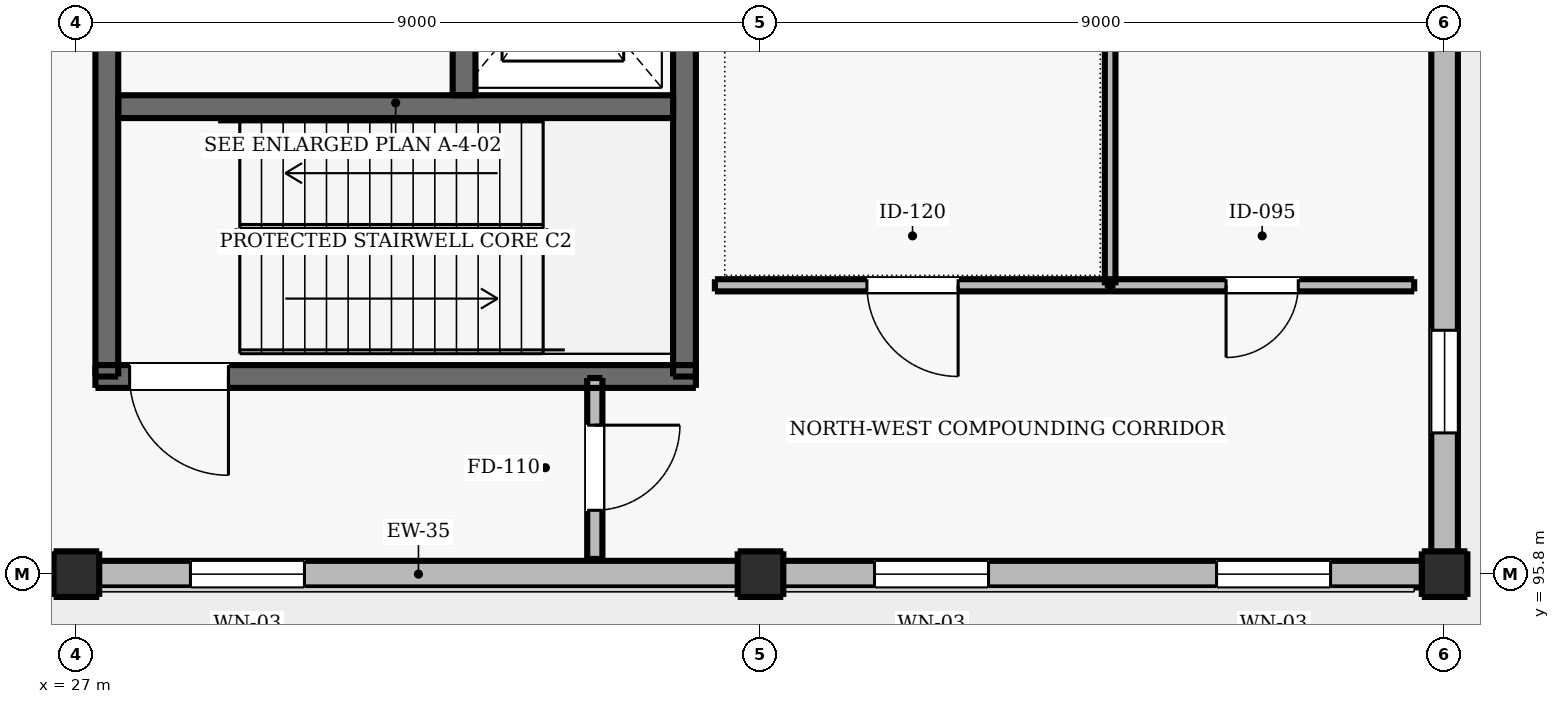
"""IFC4 building model, lengths in metres.
Left out: names, types, materials, properties, quantities, classifications, styles, units other than length and angle.
Written with IfcOpenShell. Run it as: python <this file> out.ifc"""

import sys

from ifc_helpers import new_model, si_unit, direction, frame, frame_2d, origin, origin_2d, place, context, subcontext, project, spatial, rectangle, extrude, element, fill, save


model = new_model("IFC4")
c1 = context("Model", 3, precision=1e-05, world=origin(), true_north=direction((0.0, 1.0)))
c2 = subcontext(c1, "Body", "Model", "MODEL_VIEW")
j1 = project(units=[si_unit("LENGTHUNIT", "METRE"), si_unit("PLANEANGLEUNIT", "RADIAN")], contexts=[c1])
p1 = place(None, origin())
s1 = spatial("IfcSite", under=j1, at=p1, CompositionType="ELEMENT")
p2 = place(p1, origin())
s2 = spatial("IfcBuilding", under=s1, at=p2, CompositionType="ELEMENT")
p3 = place(p2, origin())
s3 = spatial("IfcBuildingStorey", under=s2, at=p3, CompositionType="ELEMENT", Elevation=0.0)
for number, where, z_axis, x_axis in (
    (1, (27.0, 95.8, 0.0), (0.0, 0.0, 1.0), (1.0, 0.0, 0.0)),
    (2, (36.0, 95.8, 0.0), (0.0, 0.0, 1.0), (1.0, 0.0, 0.0)),
    (3, (45.0, 95.8, 0.0), (0.0, 0.0, 1.0), (1.0, 0.0, 0.0)),
):
    element("IfcColumn", number, at=place(p3, frame(where, z_axis=z_axis, x_axis=x_axis)), inside=s3, PredefinedType="COLUMN", context=c2, shape_type="SweptSolid", body=[
        extrude(rectangle(XDim=0.6, YDim=0.6, at=origin_2d()), origin(), (0.0, 0.0, 1.0), 5.1),
    ])
p4 = place(p3, frame((27.25, 98.4, 0.0), z_axis=(0.0, 0.0, 1.0), x_axis=(1.0, 0.0, 0.0)))
e4 = element("IfcWall", 4, at=p4, inside=s3, PredefinedType="SHEAR", context=c2, shape_type="SweptSolid", body=[
    extrude(rectangle(XDim=7.9, YDim=0.3, at=frame_2d((3.95, 0.0))), origin(), (0.0, 0.0, 1.0), 5.1),
])
p5 = place(p4, frame((0.45, 0.0, 0.0)))
e5 = element("IfcOpeningElement", 5, at=p5, cuts=e4, PredefinedType="OPENING", context=c2, shape_type="SweptSolid", body=[
    extrude(rectangle(XDim=1.3, YDim=2.15, at=frame_2d((0.65, 1.075))), frame((0.0, 0.16, 0.0), z_axis=(0.0, -1.0, 0.0), x_axis=(1.0, 0.0, 0.0)), (0.0, 0.0, 1.0), 0.32),
])
for number, where, z_axis, x_axis in (
    (6, (27.4, 98.4, 0.0), (0.0, 0.0, 1.0), (0.0, 1.0, 0.0)),
    (7, (35.0, 98.4, 0.0), (0.0, 0.0, 1.0), (0.0, 1.0, 0.0)),
):
    element("IfcWall", number, at=place(p3, frame(where, z_axis=z_axis, x_axis=x_axis)), inside=s3, PredefinedType="SHEAR", context=c2, shape_type="SweptSolid", body=[
        extrude(rectangle(XDim=7.2, YDim=0.3, at=frame_2d((3.6, 0.0))), origin(), (0.0, 0.0, 1.0), 5.1),
    ])
p6 = place(p3, frame((27.55, 101.95, 0.0), z_axis=(0.0, 0.0, 1.0), x_axis=(1.0, 0.0, 0.0)))
e8 = element("IfcWall", 8, at=p6, inside=s3, PredefinedType="SHEAR", context=c2, shape_type="SweptSolid", body=[
    extrude(rectangle(XDim=7.3, YDim=0.3, at=frame_2d((3.65, 0.0))), origin(), (0.0, 0.0, 1.0), 5.1),
])
p7 = place(p3, frame((32.1, 102.1, 0.0), z_axis=(0.0, 0.0, 1.0), x_axis=(0.0, 1.0, 0.0)))
e9 = element("IfcWall", 9, at=p7, inside=s3, PredefinedType="SHEAR", context=c2, shape_type="SweptSolid", body=[
    extrude(rectangle(XDim=3.35, YDim=0.3, at=frame_2d((1.675, 0.0))), origin(), (0.0, 0.0, 1.0), 5.1),
])
p8 = place(p7, frame((1.125, 0.0, 0.0)))
e10 = element("IfcOpeningElement", 10, at=p8, cuts=e9, PredefinedType="OPENING", context=c2, shape_type="SweptSolid", body=[
    extrude(rectangle(XDim=1.1, YDim=2.15, at=frame_2d((0.55, 1.075))), frame((0.0, 0.16, 0.0), z_axis=(0.0, -1.0, 0.0), x_axis=(1.0, 0.0, 0.0)), (0.0, 0.0, 1.0), 0.32),
])
p9 = place(p3, frame((45.0, 111.0, 0.0), z_axis=(0.0, 0.0, 1.0), x_axis=(0.0, -1.0, 0.0)))
e11 = element("IfcWall", 11, at=p9, inside=s3, PredefinedType="SOLIDWALL", context=c2, shape_type="SweptSolid", body=[
    extrude(rectangle(XDim=15.2, YDim=0.35, at=frame_2d((7.6, 0.0))), origin(), (0.0, 0.0, 1.0), 4.16),
])
p10 = place(p9, frame((1.858, 0.0, 1.05)))
e12 = element("IfcOpeningElement", 12, at=p10, cuts=e11, PredefinedType="OPENING", context=c2, shape_type="SweptSolid", body=[
    extrude(rectangle(XDim=1.35, YDim=1.5, at=frame_2d((0.675, 0.75))), frame((0.0, 0.185, 0.0), z_axis=(0.0, -1.0, 0.0), x_axis=(1.0, 0.0, 0.0)), (0.0, 0.0, 1.0), 0.37),
])
p11 = place(p9, frame((11.992, 0.0, 1.05)))
e13 = element("IfcOpeningElement", 13, at=p11, cuts=e11, PredefinedType="OPENING", context=c2, shape_type="SweptSolid", body=[
    extrude(rectangle(XDim=1.35, YDim=1.5, at=frame_2d((0.675, 0.75))), frame((0.0, 0.185, 0.0), z_axis=(0.0, -1.0, 0.0), x_axis=(1.0, 0.0, 0.0)), (0.0, 0.0, 1.0), 0.37),
])
p12 = place(p3, frame((45.0, 95.8, 0.0), z_axis=(0.0, 0.0, 1.0), x_axis=(-1.0, 0.0, 0.0)))
e14 = element("IfcWall", 14, at=p12, inside=s3, PredefinedType="SOLIDWALL", context=c2, shape_type="SweptSolid", body=[
    extrude(rectangle(XDim=27.0, YDim=0.35, at=frame_2d((13.5, 0.0))), origin(), (0.0, 0.0, 1.0), 4.01),
])
p13 = place(p12, frame((1.5, 0.0, 1.05)))
e15 = element("IfcOpeningElement", 15, at=p13, cuts=e14, PredefinedType="OPENING", context=c2, shape_type="SweptSolid", body=[
    extrude(rectangle(XDim=1.5, YDim=1.6, at=frame_2d((0.75, 0.8))), frame((0.0, 0.185, 0.0), z_axis=(0.0, -1.0, 0.0), x_axis=(1.0, 0.0, 0.0)), (0.0, 0.0, 1.0), 0.37),
])
p14 = place(p12, frame((6.0, 0.0, 1.05)))
e16 = element("IfcOpeningElement", 16, at=p14, cuts=e14, PredefinedType="OPENING", context=c2, shape_type="SweptSolid", body=[
    extrude(rectangle(XDim=1.5, YDim=1.6, at=frame_2d((0.75, 0.8))), frame((0.0, 0.185, 0.0), z_axis=(0.0, -1.0, 0.0), x_axis=(1.0, 0.0, 0.0)), (0.0, 0.0, 1.0), 0.37),
])
p15 = place(p12, frame((15.0, 0.0, 1.05)))
e17 = element("IfcOpeningElement", 17, at=p15, cuts=e14, PredefinedType="OPENING", context=c2, shape_type="SweptSolid", body=[
    extrude(rectangle(XDim=1.5, YDim=1.6, at=frame_2d((0.75, 0.8))), frame((0.0, 0.185, 0.0), z_axis=(0.0, -1.0, 0.0), x_axis=(1.0, 0.0, 0.0)), (0.0, 0.0, 1.0), 0.37),
])
p16 = place(p12, frame((19.5, 0.0, 1.05)))
e18 = element("IfcOpeningElement", 18, at=p16, cuts=e14, PredefinedType="OPENING", context=c2, shape_type="SweptSolid", body=[
    extrude(rectangle(XDim=1.5, YDim=1.6, at=frame_2d((0.75, 0.8))), frame((0.0, 0.185, 0.0), z_axis=(0.0, -1.0, 0.0), x_axis=(1.0, 0.0, 0.0)), (0.0, 0.0, 1.0), 0.37),
])
p17 = place(p12, frame((24.0, 0.0, 1.05)))
e19 = element("IfcOpeningElement", 19, at=p17, cuts=e14, PredefinedType="OPENING", context=c2, shape_type="SweptSolid", body=[
    extrude(rectangle(XDim=1.5, YDim=1.6, at=frame_2d((0.75, 0.8))), frame((0.0, 0.185, 0.0), z_axis=(0.0, -1.0, 0.0), x_axis=(1.0, 0.0, 0.0)), (0.0, 0.0, 1.0), 0.37),
])
p18 = place(p3, frame((33.82, 96.0, 0.0), z_axis=(0.0, 0.0, 1.0), x_axis=(0.0, 1.0, 0.0)))
e20 = element("IfcWall", 20, at=p18, inside=s3, PredefinedType="PARTITIONING", context=c2, shape_type="SweptSolid", body=[
    extrude(rectangle(XDim=2.38, YDim=0.2, at=frame_2d((1.19, 0.0))), origin(), (0.0, 0.0, 1.0), 4.82),
])
p19 = place(p18, frame((0.64, 0.0, 0.0)))
e21 = element("IfcOpeningElement", 21, at=p19, cuts=e20, PredefinedType="OPENING", context=c2, shape_type="SweptSolid", body=[
    extrude(rectangle(XDim=1.12, YDim=2.15, at=frame_2d((0.56, 1.075))), frame((0.0, 0.11, 0.0), z_axis=(0.0, -1.0, 0.0), x_axis=(1.0, 0.0, 0.0)), (0.0, 0.0, 1.0), 0.22),
])
p20 = place(p3, frame((35.4, 99.6, 0.0), z_axis=(0.0, 0.0, 1.0), x_axis=(1.0, 0.0, 0.0)))
e22 = element("IfcWall", 22, at=p20, inside=s3, PredefinedType="PARTITIONING", context=c2, shape_type="SweptSolid", body=[
    extrude(rectangle(XDim=5.2, YDim=0.16, at=frame_2d((2.6, 0.0))), origin(), (0.0, 0.0, 1.0), 4.82),
])
p21 = place(p20, frame((2.0, 0.0, 0.0)))
e23 = element("IfcOpeningElement", 23, at=p21, cuts=e22, PredefinedType="OPENING", context=c2, shape_type="SweptSolid", body=[
    extrude(rectangle(XDim=1.2, YDim=2.2, at=frame_2d((0.6, 1.1))), frame((0.0, 0.09, 0.0), z_axis=(0.0, -1.0, 0.0), x_axis=(1.0, 0.0, 0.0)), (0.0, 0.0, 1.0), 0.18),
])
p22 = place(p3, frame((40.6, 99.6, 0.0), z_axis=(0.0, 0.0, 1.0), x_axis=(0.0, 1.0, 0.0)))
e24 = element("IfcWall", 24, at=p22, inside=s3, PredefinedType="PARTITIONING", context=c2, shape_type="SweptSolid", body=[
    extrude(rectangle(XDim=11.0, YDim=0.14, at=frame_2d((5.5, 0.0))), origin(), (0.0, 0.0, 1.0), 4.82),
])
p23 = place(p3, frame((40.6, 99.6, 0.0), z_axis=(0.0, 0.0, 1.0), x_axis=(1.0, 0.0, 0.0)))
e25 = element("IfcWall", 25, at=p23, inside=s3, PredefinedType="PARTITIONING", context=c2, shape_type="SweptSolid", body=[
    extrude(rectangle(XDim=4.0, YDim=0.16, at=frame_2d((2.0, 0.0))), origin(), (0.0, 0.0, 1.0), 4.82),
])
p24 = place(p23, frame((1.525, 0.0, 0.0)))
e26 = element("IfcOpeningElement", 26, at=p24, cuts=e25, PredefinedType="OPENING", context=c2, shape_type="SweptSolid", body=[
    extrude(rectangle(XDim=0.95, YDim=2.1, at=frame_2d((0.475, 1.05))), frame((0.0, 0.09, 0.0), z_axis=(0.0, -1.0, 0.0), x_axis=(1.0, 0.0, 0.0)), (0.0, 0.0, 1.0), 0.18),
])
p25 = place(p11, origin())
e27 = element("IfcWindow", 27, at=p25, inside=s3, PartitioningType="SINGLE_PANEL", PredefinedType="WINDOW", context=c2, shape_type="SweptSolid", body=[
    extrude(rectangle(XDim=1.35, YDim=1.5, at=frame_2d((0.675, 0.75))), frame((0.0, 0.03, 0.0), z_axis=(0.0, -1.0, 0.0), x_axis=(1.0, 0.0, 0.0)), (0.0, 0.0, 1.0), 0.06),
])
fill(e13, e27)
p26 = place(p13, origin())
e28 = element("IfcWindow", 28, at=p26, inside=s3, PartitioningType="SINGLE_PANEL", PredefinedType="WINDOW", context=c2, shape_type="SweptSolid", body=[
    extrude(rectangle(XDim=1.5, YDim=1.6, at=frame_2d((0.75, 0.8))), frame((0.0, 0.03, 0.0), z_axis=(0.0, -1.0, 0.0), x_axis=(1.0, 0.0, 0.0)), (0.0, 0.0, 1.0), 0.06),
])
fill(e15, e28)
p27 = place(p14, origin())
e29 = element("IfcWindow", 29, at=p27, inside=s3, PartitioningType="SINGLE_PANEL", PredefinedType="WINDOW", context=c2, shape_type="SweptSolid", body=[
    extrude(rectangle(XDim=1.5, YDim=1.6, at=frame_2d((0.75, 0.8))), frame((0.0, 0.03, 0.0), z_axis=(0.0, -1.0, 0.0), x_axis=(1.0, 0.0, 0.0)), (0.0, 0.0, 1.0), 0.06),
])
fill(e16, e29)
p28 = place(p15, origin())
e30 = element("IfcWindow", 30, at=p28, inside=s3, PartitioningType="SINGLE_PANEL", PredefinedType="WINDOW", context=c2, shape_type="SweptSolid", body=[
    extrude(rectangle(XDim=1.5, YDim=1.6, at=frame_2d((0.75, 0.8))), frame((0.0, 0.03, 0.0), z_axis=(0.0, -1.0, 0.0), x_axis=(1.0, 0.0, 0.0)), (0.0, 0.0, 1.0), 0.06),
])
fill(e17, e30)
p29 = place(p5, frame((1.3, 0.0, 0.0), z_axis=(0.0, 0.0, 1.0), x_axis=(-1.0, 0.0, 0.0)))
e31 = element("IfcDoor", 31, at=p29, inside=s3, OperationType="SINGLE_SWING_RIGHT", PredefinedType="DOOR", context=c2, shape_type="SweptSolid", body=[
    extrude(rectangle(XDim=1.3, YDim=2.15, at=frame_2d((0.65, 1.075))), frame((0.0, 0.025, 0.0), z_axis=(0.0, -1.0, 0.0), x_axis=(1.0, 0.0, 0.0)), (0.0, 0.0, 1.0), 0.05),
])
fill(e5, e31)
p30 = place(p19, frame((1.12, 0.0, 0.0), z_axis=(0.0, 0.0, 1.0), x_axis=(-1.0, 0.0, 0.0)))
e32 = element("IfcDoor", 32, at=p30, inside=s3, OperationType="SINGLE_SWING_RIGHT", PredefinedType="DOOR", context=c2, shape_type="SweptSolid", body=[
    extrude(rectangle(XDim=1.12, YDim=2.15, at=frame_2d((0.56, 1.075))), frame((0.0, 0.025, 0.0), z_axis=(0.0, -1.0, 0.0), x_axis=(1.0, 0.0, 0.0)), (0.0, 0.0, 1.0), 0.05),
])
fill(e21, e32)
p31 = place(p21, frame((1.2, 0.0, 0.0), z_axis=(0.0, 0.0, 1.0), x_axis=(-1.0, 0.0, 0.0)))
e33 = element("IfcDoor", 33, at=p31, inside=s3, OperationType="SINGLE_SWING_RIGHT", PredefinedType="DOOR", context=c2, shape_type="SweptSolid", body=[
    extrude(rectangle(XDim=1.2, YDim=2.2, at=frame_2d((0.6, 1.1))), frame((0.0, 0.025, 0.0), z_axis=(0.0, -1.0, 0.0), x_axis=(1.0, 0.0, 0.0)), (0.0, 0.0, 1.0), 0.05),
])
fill(e23, e33)
p32 = place(p24, frame((0.95, 0.0, 0.0), z_axis=(0.0, 0.0, 1.0), x_axis=(-1.0, 0.0, 0.0)))
e34 = element("IfcDoor", 34, at=p32, inside=s3, OperationType="SINGLE_SWING_LEFT", PredefinedType="DOOR", context=c2, shape_type="SweptSolid", body=[
    extrude(rectangle(XDim=0.95, YDim=2.1, at=frame_2d((0.475, 1.05))), frame((0.0, 0.025, 0.0), z_axis=(0.0, -1.0, 0.0), x_axis=(1.0, 0.0, 0.0)), (0.0, 0.0, 1.0), 0.05),
])
fill(e26, e34)
save(model, sys.argv[1])
